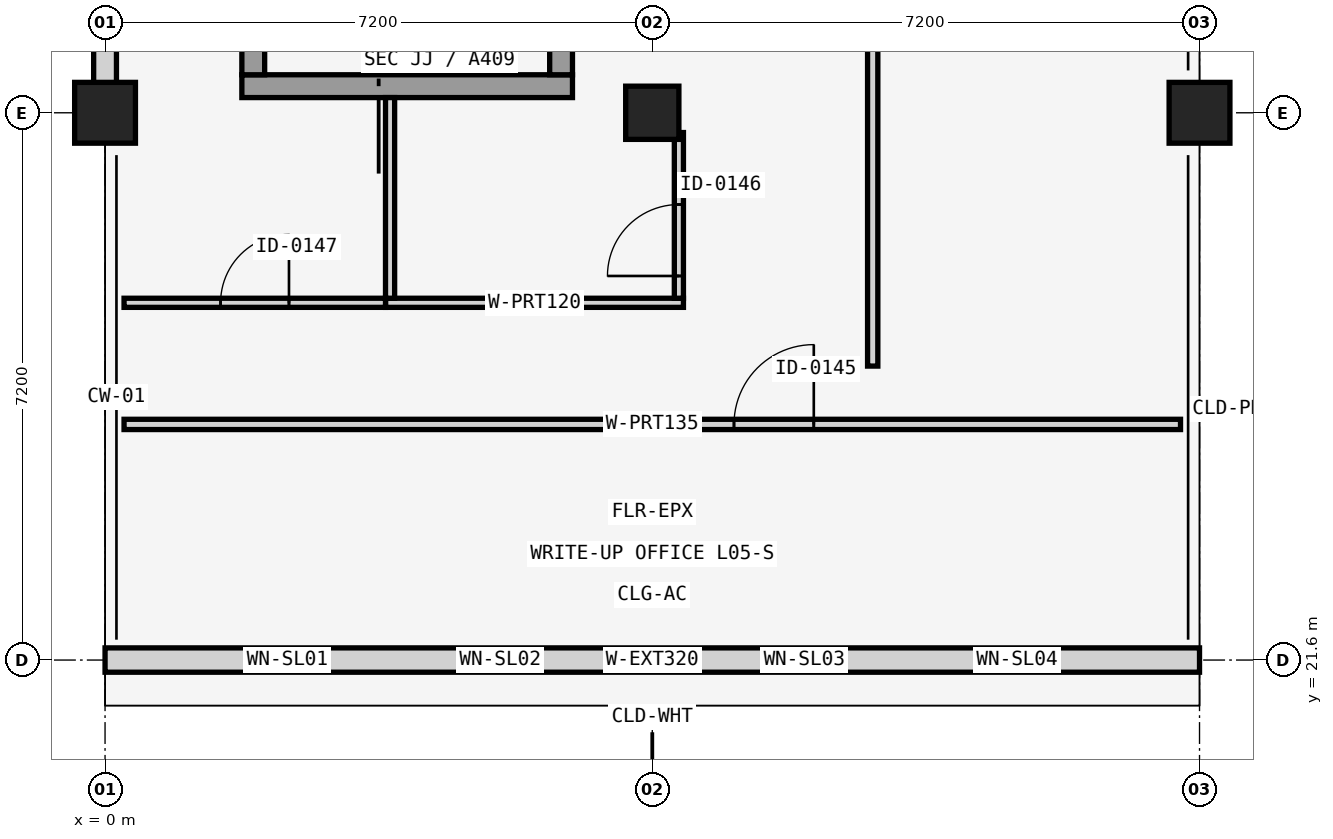
"""IFC4 building model, lengths in metres.
Left out: names, types, materials, properties, quantities, classifications, styles, units other than length and angle.
Written with IfcOpenShell. Run it as: python <this file> out.ifc"""

import sys

from ifc_helpers import new_model, si_unit, direction, frame, frame_2d, origin, origin_2d, place, context, subcontext, project, spatial, rectangle, extrude, element, fill, save


model = new_model("IFC4")
c1 = context("Model", 3, precision=1e-05, world=origin(), true_north=direction((0.0, 1.0)))
c2 = subcontext(c1, "Body", "Model", "MODEL_VIEW")
j1 = project(units=[si_unit("LENGTHUNIT", "METRE"), si_unit("PLANEANGLEUNIT", "RADIAN")], contexts=[c1])
p1 = place(None, origin())
s1 = spatial("IfcSite", under=j1, at=p1, CompositionType="ELEMENT")
p2 = place(p1, origin())
s2 = spatial("IfcBuilding", under=s1, at=p2, CompositionType="ELEMENT")
p3 = place(p2, frame((0.0, 0.0, 21.44)))
s3 = spatial("IfcBuildingStorey", under=s2, at=p3, CompositionType="ELEMENT", Elevation=21.44)
p4 = place(p3, frame((0.0, 28.8, 0.0), z_axis=(0.0, 0.0, 1.0), x_axis=(1.0, 0.0, 0.0)))
e1 = element("IfcColumn", 1, at=p4, inside=s3, PredefinedType="COLUMN", context=c2, shape_type="SweptSolid", body=[
    extrude(rectangle(XDim=0.8, YDim=0.8, at=origin_2d()), origin(), (0.0, 0.0, 1.0), 4.16),
])
p5 = place(p3, frame((7.2, 28.8, 0.0), z_axis=(0.0, 0.0, 1.0), x_axis=(1.0, 0.0, 0.0)))
e2 = element("IfcColumn", 2, at=p5, inside=s3, PredefinedType="COLUMN", context=c2, shape_type="SweptSolid", body=[
    extrude(rectangle(XDim=0.7, YDim=0.7, at=origin_2d()), origin(), (0.0, 0.0, 1.0), 4.16),
])
p6 = place(p3, frame((14.4, 28.8, 0.0), z_axis=(0.0, 0.0, 1.0), x_axis=(1.0, 0.0, 0.0)))
e3 = element("IfcColumn", 3, at=p6, inside=s3, PredefinedType="COLUMN", context=c2, shape_type="SweptSolid", body=[
    extrude(rectangle(XDim=0.8, YDim=0.8, at=origin_2d()), origin(), (0.0, 0.0, 1.0), 4.16),
])
p7 = place(p3, frame((0.0, 21.6, 0.0), z_axis=(0.0, 0.0, 1.0), x_axis=(1.0, 0.0, 0.0)))
e4 = element("IfcWall", 4, at=p7, inside=s3, PredefinedType="SOLIDWALL", context=c2, shape_type="SweptSolid", body=[
    extrude(rectangle(XDim=14.4, YDim=0.32, at=frame_2d((7.2, 0.0))), origin(), (0.0, 0.0, 1.0), 3.01),
])
p8 = place(p7, frame((2.175, 0.0, 0.45)))
e5 = element("IfcOpeningElement", 5, at=p8, cuts=e4, PredefinedType="OPENING", context=c2, shape_type="SweptSolid", body=[
    extrude(rectangle(XDim=0.45, YDim=2.4, at=frame_2d((0.225, 1.2))), frame((0.0, 0.17, 0.0), z_axis=(0.0, -1.0, 0.0), x_axis=(1.0, 0.0, 0.0)), (0.0, 0.0, 1.0), 0.34),
])
p9 = place(p7, frame((4.95, 0.0, 0.45)))
e6 = element("IfcOpeningElement", 6, at=p9, cuts=e4, PredefinedType="OPENING", context=c2, shape_type="SweptSolid", body=[
    extrude(rectangle(XDim=0.5, YDim=2.4, at=frame_2d((0.25, 1.2))), frame((0.0, 0.17, 0.0), z_axis=(0.0, -1.0, 0.0), x_axis=(1.0, 0.0, 0.0)), (0.0, 0.0, 1.0), 0.34),
])
p10 = place(p7, frame((8.925, 0.0, 0.65)))
e7 = element("IfcOpeningElement", 7, at=p10, cuts=e4, PredefinedType="OPENING", context=c2, shape_type="SweptSolid", body=[
    extrude(rectangle(XDim=0.55, YDim=2.2, at=frame_2d((0.275, 1.1))), frame((0.0, 0.17, 0.0), z_axis=(0.0, -1.0, 0.0), x_axis=(1.0, 0.0, 0.0)), (0.0, 0.0, 1.0), 0.34),
])
p11 = place(p7, frame((11.775, 0.0, 0.75)))
e8 = element("IfcOpeningElement", 8, at=p11, cuts=e4, PredefinedType="OPENING", context=c2, shape_type="SweptSolid", body=[
    extrude(rectangle(XDim=0.45, YDim=2.1, at=frame_2d((0.225, 1.05))), frame((0.0, 0.17, 0.0), z_axis=(0.0, -1.0, 0.0), x_axis=(1.0, 0.0, 0.0)), (0.0, 0.0, 1.0), 0.34),
])
p12 = place(p3, frame((0.0, 29.19, 0.0), z_axis=(0.0, 0.0, 1.0), x_axis=(0.0, 1.0, 0.0)))
e9 = element("IfcWall", 9, at=p12, inside=s3, PredefinedType="SOLIDWALL", context=c2, shape_type="SweptSolid", body=[
    extrude(rectangle(XDim=6.42, YDim=0.3, at=frame_2d((3.21, 0.0))), origin(), (0.0, 0.0, 1.0), 3.01),
])
p13 = place(p3, frame((1.8, 29.15, 0.0), z_axis=(0.0, 0.0, 1.0), x_axis=(1.0, 0.0, 0.0)))
e10 = element("IfcWall", 10, at=p13, inside=s3, PredefinedType="SHEAR", context=c2, shape_type="SweptSolid", body=[
    extrude(rectangle(XDim=4.35, YDim=0.3, at=frame_2d((2.175, 0.0))), origin(), (0.0, 0.0, 1.0), 3.81),
])
p14 = place(p3, frame((1.95, 29.3, 0.0), z_axis=(0.0, 0.0, 1.0), x_axis=(0.0, 1.0, 0.0)))
e11 = element("IfcWall", 11, at=p14, inside=s3, PredefinedType="SHEAR", context=c2, shape_type="SweptSolid", body=[
    extrude(rectangle(XDim=7.8, YDim=0.3, at=frame_2d((3.9, 0.0))), origin(), (0.0, 0.0, 1.0), 3.81),
])
p15 = place(p3, frame((6.0, 29.3, 0.0), z_axis=(0.0, 0.0, 1.0), x_axis=(0.0, 1.0, 0.0)))
e12 = element("IfcWall", 12, at=p15, inside=s3, PredefinedType="SHEAR", context=c2, shape_type="SweptSolid", body=[
    extrude(rectangle(XDim=7.8, YDim=0.3, at=frame_2d((3.9, 0.0))), origin(), (0.0, 0.0, 1.0), 3.81),
])
p16 = place(p15, frame((0.4, 0.0, 0.0)))
e13 = element("IfcOpeningElement", 13, at=p16, cuts=e12, PredefinedType="OPENING", context=c2, shape_type="SweptSolid", body=[
    extrude(rectangle(XDim=1.15, YDim=2.2, at=frame_2d((0.575, 1.1))), frame((0.0, 0.16, 0.0), z_axis=(0.0, -1.0, 0.0), x_axis=(1.0, 0.0, 0.0)), (0.0, 0.0, 1.0), 0.32),
])
p17 = place(p3, frame((0.25, 24.7, 0.0), z_axis=(0.0, 0.0, 1.0), x_axis=(1.0, 0.0, 0.0)))
e14 = element("IfcWall", 14, at=p17, inside=s3, PredefinedType="PARTITIONING", context=c2, shape_type="SweptSolid", body=[
    extrude(rectangle(XDim=13.9, YDim=0.135, at=frame_2d((6.95, 0.0))), origin(), (0.0, 0.0, 1.0), 3.01),
])
p18 = place(p17, frame((8.025, 0.0, 0.0)))
e15 = element("IfcOpeningElement", 15, at=p18, cuts=e14, PredefinedType="OPENING", context=c2, shape_type="SweptSolid", body=[
    extrude(rectangle(XDim=1.05, YDim=2.15, at=frame_2d((0.525, 1.075))), frame((0.0, 0.078, 0.0), z_axis=(0.0, -1.0, 0.0), x_axis=(1.0, 0.0, 0.0)), (0.0, 0.0, 1.0), 0.155),
])
p19 = place(p3, frame((3.69, 26.3, 0.0), z_axis=(0.0, 0.0, 1.0), x_axis=(1.0, 0.0, 0.0)))
e16 = element("IfcWall", 16, at=p19, inside=s3, PredefinedType="PARTITIONING", context=c2, shape_type="SweptSolid", body=[
    extrude(rectangle(XDim=3.92, YDim=0.12, at=frame_2d((1.96, 0.0))), origin(), (0.0, 0.0, 1.0), 3.01),
])
p20 = place(p3, frame((3.75, 26.36, 0.0), z_axis=(0.0, 0.0, 1.0), x_axis=(0.0, 1.0, 0.0)))
e17 = element("IfcWall", 17, at=p20, inside=s3, PredefinedType="PARTITIONING", context=c2, shape_type="SweptSolid", body=[
    extrude(rectangle(XDim=2.64, YDim=0.12, at=frame_2d((1.32, 0.0))), origin(), (0.0, 0.0, 1.0), 3.21),
])
p21 = place(p3, frame((7.55, 26.36, 0.0), z_axis=(0.0, 0.0, 1.0), x_axis=(0.0, 1.0, 0.0)))
e18 = element("IfcWall", 18, at=p21, inside=s3, PredefinedType="PARTITIONING", context=c2, shape_type="SweptSolid", body=[
    extrude(rectangle(XDim=2.18, YDim=0.12, at=frame_2d((1.09, 0.0))), origin(), (0.0, 0.0, 1.0), 3.81),
])
p22 = place(p21, frame((0.293, 0.0, 0.0)))
e19 = element("IfcOpeningElement", 19, at=p22, cuts=e18, PredefinedType="OPENING", context=c2, shape_type="SweptSolid", body=[
    extrude(rectangle(XDim=0.94, YDim=2.1, at=frame_2d((0.47, 1.05))), frame((0.0, 0.07, 0.0), z_axis=(0.0, -1.0, 0.0), x_axis=(1.0, 0.0, 0.0)), (0.0, 0.0, 1.0), 0.14),
])
p23 = place(p3, frame((0.25, 26.3, 0.0), z_axis=(0.0, 0.0, 1.0), x_axis=(1.0, 0.0, 0.0)))
e20 = element("IfcWall", 20, at=p23, inside=s3, PredefinedType="PARTITIONING", context=c2, shape_type="SweptSolid", body=[
    extrude(rectangle(XDim=3.44, YDim=0.12, at=frame_2d((1.72, 0.0))), origin(), (0.0, 0.0, 1.0), 3.81),
])
p24 = place(p23, frame((1.27, 0.0, 0.0)))
e21 = element("IfcOpeningElement", 21, at=p24, cuts=e20, PredefinedType="OPENING", context=c2, shape_type="SweptSolid", body=[
    extrude(rectangle(XDim=0.9, YDim=2.1, at=frame_2d((0.45, 1.05))), frame((0.0, 0.07, 0.0), z_axis=(0.0, -1.0, 0.0), x_axis=(1.0, 0.0, 0.0)), (0.0, 0.0, 1.0), 0.14),
])
p25 = place(p3, frame((10.1, 25.468, 0.0), z_axis=(0.0, 0.0, 1.0), x_axis=(0.0, 1.0, 0.0)))
e22 = element("IfcWall", 22, at=p25, inside=s3, PredefinedType="PARTITIONING", context=c2, shape_type="SweptSolid", body=[
    extrude(rectangle(XDim=15.665, YDim=0.135, at=frame_2d((7.833, 0.0))), origin(), (0.0, 0.0, 1.0), 3.21),
])
p26 = place(p25, frame((7.373, 0.0, 0.0)))
e23 = element("IfcOpeningElement", 23, at=p26, cuts=e22, PredefinedType="OPENING", context=c2, shape_type="SweptSolid", body=[
    extrude(rectangle(XDim=0.92, YDim=2.1, at=frame_2d((0.46, 1.05))), frame((0.0, 0.078, 0.0), z_axis=(0.0, -1.0, 0.0), x_axis=(1.0, 0.0, 0.0)), (0.0, 0.0, 1.0), 0.155),
])
p27 = place(p8, origin())
e24 = element("IfcWindow", 24, at=p27, inside=s3, PartitioningType="SINGLE_PANEL", PredefinedType="WINDOW", context=c2, shape_type="SweptSolid", body=[
    extrude(rectangle(XDim=0.45, YDim=2.4, at=frame_2d((0.225, 1.2))), frame((0.0, 0.03, 0.0), z_axis=(0.0, -1.0, 0.0), x_axis=(1.0, 0.0, 0.0)), (0.0, 0.0, 1.0), 0.06),
])
fill(e5, e24)
p28 = place(p9, origin())
e25 = element("IfcWindow", 25, at=p28, inside=s3, PartitioningType="SINGLE_PANEL", PredefinedType="WINDOW", context=c2, shape_type="SweptSolid", body=[
    extrude(rectangle(XDim=0.5, YDim=2.4, at=frame_2d((0.25, 1.2))), frame((0.0, 0.03, 0.0), z_axis=(0.0, -1.0, 0.0), x_axis=(1.0, 0.0, 0.0)), (0.0, 0.0, 1.0), 0.06),
])
fill(e6, e25)
p29 = place(p10, origin())
e26 = element("IfcWindow", 26, at=p29, inside=s3, PartitioningType="SINGLE_PANEL", PredefinedType="WINDOW", context=c2, shape_type="SweptSolid", body=[
    extrude(rectangle(XDim=0.55, YDim=2.2, at=frame_2d((0.275, 1.1))), frame((0.0, 0.03, 0.0), z_axis=(0.0, -1.0, 0.0), x_axis=(1.0, 0.0, 0.0)), (0.0, 0.0, 1.0), 0.06),
])
fill(e7, e26)
p30 = place(p11, origin())
e27 = element("IfcWindow", 27, at=p30, inside=s3, PartitioningType="SINGLE_PANEL", PredefinedType="WINDOW", context=c2, shape_type="SweptSolid", body=[
    extrude(rectangle(XDim=0.45, YDim=2.1, at=frame_2d((0.225, 1.05))), frame((0.0, 0.03, 0.0), z_axis=(0.0, -1.0, 0.0), x_axis=(1.0, 0.0, 0.0)), (0.0, 0.0, 1.0), 0.06),
])
fill(e8, e27)
p31 = place(p18, origin())
e28 = element("IfcDoor", 28, at=p31, inside=s3, OperationType="SINGLE_SWING_RIGHT", PredefinedType="DOOR", context=c2, shape_type="SweptSolid", body=[
    extrude(rectangle(XDim=1.05, YDim=2.15, at=frame_2d((0.525, 1.075))), frame((0.0, 0.025, 0.0), z_axis=(0.0, -1.0, 0.0), x_axis=(1.0, 0.0, 0.0)), (0.0, 0.0, 1.0), 0.05),
])
fill(e15, e28)
p32 = place(p22, frame((0.94, 0.0, 0.0), z_axis=(0.0, 0.0, 1.0), x_axis=(-1.0, 0.0, 0.0)))
e29 = element("IfcDoor", 29, at=p32, inside=s3, OperationType="SINGLE_SWING_LEFT", PredefinedType="DOOR", context=c2, shape_type="SweptSolid", body=[
    extrude(rectangle(XDim=0.94, YDim=2.1, at=frame_2d((0.47, 1.05))), frame((0.0, 0.025, 0.0), z_axis=(0.0, -1.0, 0.0), x_axis=(1.0, 0.0, 0.0)), (0.0, 0.0, 1.0), 0.05),
])
fill(e19, e29)
p33 = place(p24, origin())
e30 = element("IfcDoor", 30, at=p33, inside=s3, OperationType="SINGLE_SWING_RIGHT", PredefinedType="DOOR", context=c2, shape_type="SweptSolid", body=[
    extrude(rectangle(XDim=0.9, YDim=2.1, at=frame_2d((0.45, 1.05))), frame((0.0, 0.025, 0.0), z_axis=(0.0, -1.0, 0.0), x_axis=(1.0, 0.0, 0.0)), (0.0, 0.0, 1.0), 0.05),
])
fill(e21, e30)
save(model, sys.argv[1])
